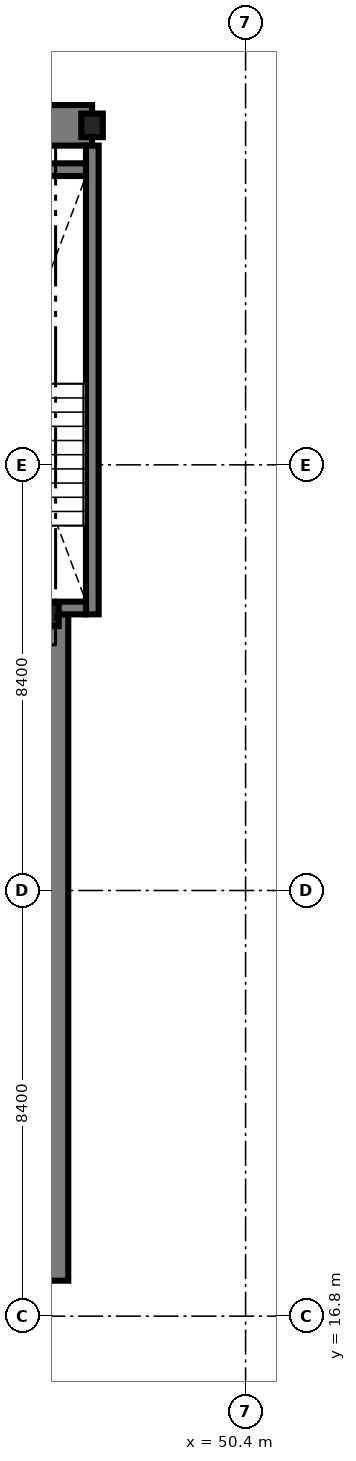
"""IFC4 building model, lengths in metres.
Left out: names, types, materials, properties, quantities, classifications, styles, units other than length and angle.
Written with IfcOpenShell. Run it as: python <this file> out.ifc"""

import sys

from ifc_helpers import new_model, si_unit, direction, frame, frame_2d, origin, origin_2d, place, context, subcontext, project, spatial, rectangle, i_section, extrude, source, transform, mapped, element, save


model = new_model("IFC4")
c1 = context("Model", 3, precision=1e-05, world=origin(), true_north=direction((0.0, 1.0)))
c2 = subcontext(c1, "Body", "Model", "MODEL_VIEW")
j1 = project(units=[si_unit("LENGTHUNIT", "METRE"), si_unit("PLANEANGLEUNIT", "RADIAN")], contexts=[c1])
p1 = place(None, origin())
s1 = spatial("IfcSite", under=j1, at=p1, CompositionType="ELEMENT")
p2 = place(p1, origin())
s2 = spatial("IfcBuilding", under=s1, at=p2, CompositionType="ELEMENT")
p3 = place(p2, frame((0.0, 0.0, 163.1)))
s3 = spatial("IfcBuildingStorey", under=s2, at=p3, CompositionType="ELEMENT", Elevation=163.1)
m1 = source(origin(), c2, "Body", "SweptSolid", [
    extrude(rectangle(XDim=17.52, YDim=0.8, at=frame_2d((8.76, 0.0))), origin(), (0.0, 0.0, 1.0), 3.05),
])
p4 = place(p3, frame((29.85, 40.3, 0.0), z_axis=(0.0, 0.0, 1.0), x_axis=(1.0, 0.0, 0.0)))
e1 = element("IfcWall", 1, at=p4, inside=s3, PredefinedType="SHEAR", context=c2, shape_type="MappedRepresentation", body=[
    mapped(m1, transform((0.0, 0.0, 0.0), scale=1.0)),
])
m2 = source(origin(), c2, "Body", "SweptSolid", [
    extrude(rectangle(XDim=13.15, YDim=0.8, at=frame_2d((6.575, 0.0))), origin(), (0.0, 0.0, 1.0), 3.05),
])
p5 = place(p3, frame((46.5, 17.5, 0.0), z_axis=(0.0, 0.0, 1.0), x_axis=(0.0, 1.0, 0.0)))
e2 = element("IfcWall", 2, at=p5, inside=s3, PredefinedType="SHEAR", context=c2, shape_type="MappedRepresentation", body=[
    mapped(m2, transform((0.0, 0.0, 0.0), scale=1.0)),
])
m3 = source(origin(), c2, "Body", "SweptSolid", [
    extrude(i_section(OverallWidth=0.424, OverallDepth=0.465, WebThickness=0.035, FlangeThickness=0.056, FilletRadius=0.015, at=origin_2d()), origin(), (0.0, 0.0, 1.0), 3.05),
])
for number, where, z_axis, x_axis in (
    (3, (46.5, 30.65, 0.0), (0.0, 0.0, 1.0), (1.0, 0.0, 0.0)),
    (4, (47.37, 40.3, 0.0), (0.0, 0.0, 1.0), (1.0, 0.0, 0.0)),
):
    element("IfcColumn", number, at=place(p3, frame(where, z_axis=z_axis, x_axis=x_axis)), inside=s3, PredefinedType="COLUMN", context=c2, shape_type="MappedRepresentation", body=[
        mapped(m3, transform((0.0, 0.0, 0.0), scale=1.0)),
    ])
m4 = source(origin(), c2, "Body", "SweptSolid", [
    extrude(rectangle(XDim=9.25, YDim=0.25, at=frame_2d((4.625, 0.0))), origin(), (0.0, 0.0, 1.0), 3.5),
])
p6 = place(p3, frame((47.375, 30.65, 0.0), z_axis=(0.0, 0.0, 1.0), x_axis=(0.0, 1.0, 0.0)))
e5 = element("IfcWall", 5, at=p6, inside=s3, PredefinedType="SOLIDWALL", context=c2, shape_type="MappedRepresentation", body=[
    mapped(m4, transform((0.0, 0.0, 0.0), scale=1.0)),
])
m5 = source(origin(), c2, "Body", "SweptSolid", [
    extrude(rectangle(XDim=3.15, YDim=0.25, at=frame_2d((1.575, 0.0))), origin(), (0.0, 0.0, 1.0), 3.5),
])
p7 = place(p3, frame((44.1, 39.425, 0.0), z_axis=(0.0, 0.0, 1.0), x_axis=(1.0, 0.0, 0.0)))
e6 = element("IfcWall", 6, at=p7, inside=s3, PredefinedType="SOLIDWALL", context=c2, shape_type="MappedRepresentation", body=[
    mapped(m5, transform((0.0, 0.0, 0.0), scale=1.0)),
])
p8 = place(p3, frame((44.1, 30.775, 0.0), z_axis=(0.0, 0.0, 1.0), x_axis=(1.0, 0.0, 0.0)))
e7 = element("IfcWall", 7, at=p8, inside=s3, PredefinedType="SOLIDWALL", context=c2, shape_type="MappedRepresentation", body=[
    mapped(m5, transform((0.0, 0.0, 0.0), scale=1.0)),
])
m6 = source(origin(), c2, "Body", "SweptSolid", [
    extrude(rectangle(XDim=1.1, YDim=2.2, at=frame_2d((0.55, 1.1))), frame((0.0, 0.135, 0.0), z_axis=(0.0, -1.0, 0.0), x_axis=(1.0, 0.0, 0.0)), (0.0, 0.0, 1.0), 0.27),
])
p9 = place(p8, frame((0.35, 0.0, 0.0)))
e8 = element("IfcOpeningElement", 8, at=p9, cuts=e7, PredefinedType="OPENING", context=c2, shape_type="MappedRepresentation", body=[
    mapped(m6, transform((0.0, 0.0, 0.0), scale=1.0)),
])
save(model, sys.argv[1])
